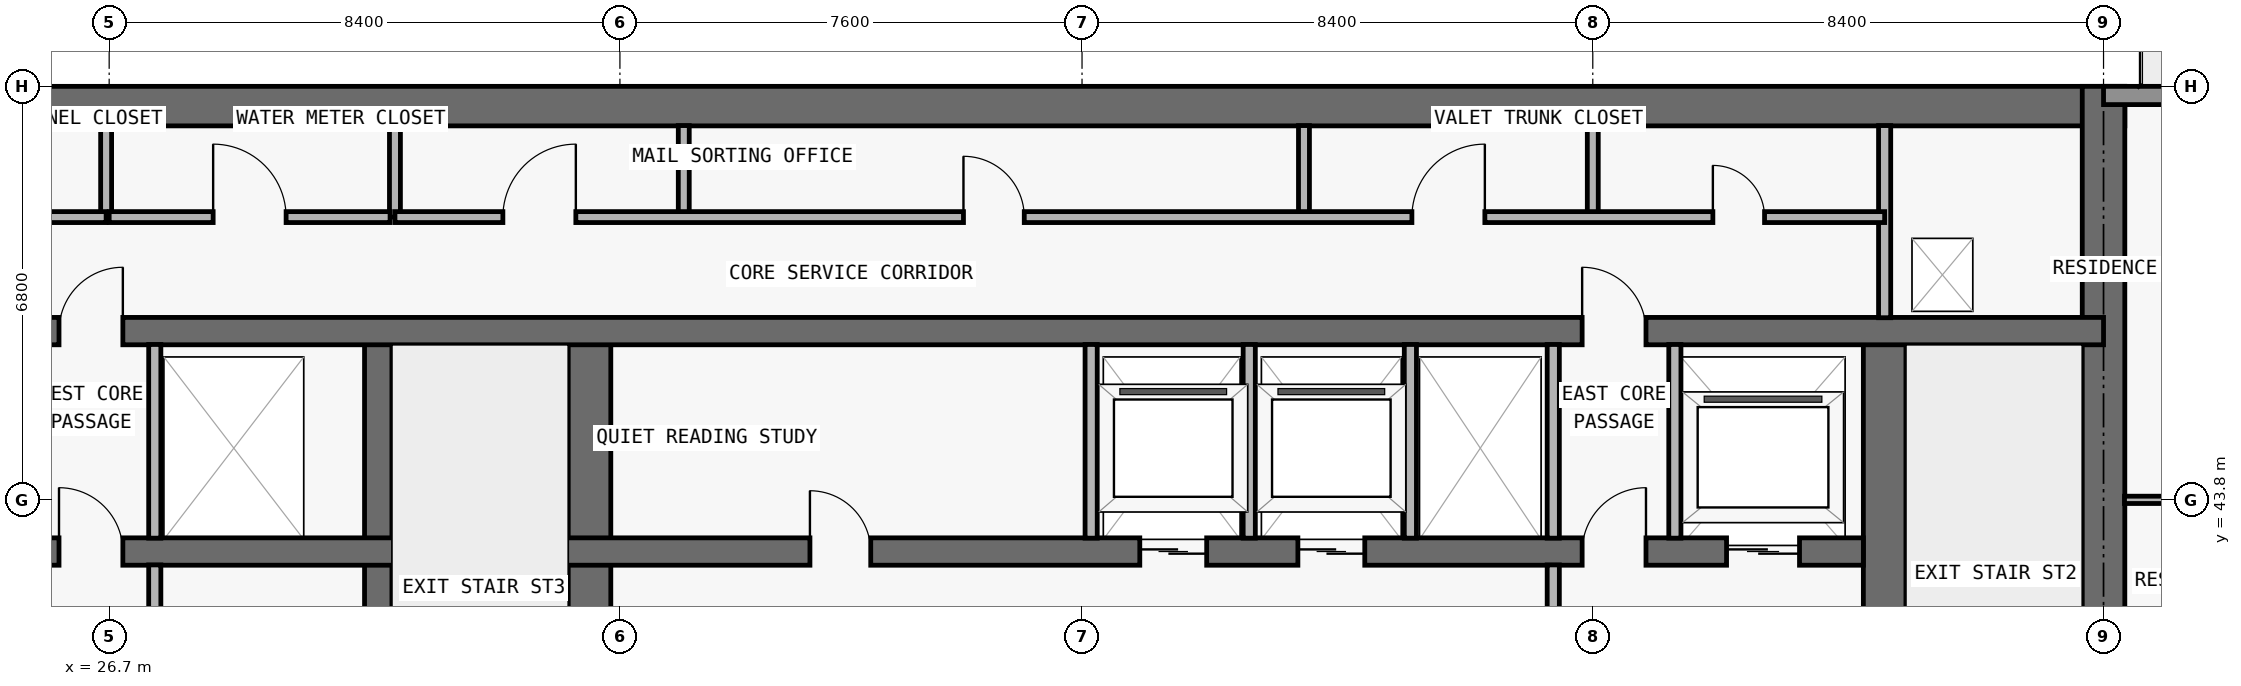
"""IFC4 building model, lengths in metres.
Left out: names, types, materials, properties, quantities, classifications, styles, units other than length and angle.
Written with IfcOpenShell. Run it as: python <this file> out.ifc"""

import sys

from ifc_helpers import new_model, si_unit, direction, frame, frame_2d, origin, place, context, subcontext, project, spatial, rectangle, extrude, element, fill, save


model = new_model("IFC4")
c1 = context("Model", 3, precision=1e-05, world=origin(), true_north=direction((0.0, 1.0)))
c2 = subcontext(c1, "Body", "Model", "MODEL_VIEW")
j1 = project(units=[si_unit("LENGTHUNIT", "METRE"), si_unit("PLANEANGLEUNIT", "RADIAN")], contexts=[c1])
p1 = place(None, origin())
s1 = spatial("IfcSite", under=j1, at=p1, CompositionType="ELEMENT")
p2 = place(p1, origin())
s2 = spatial("IfcBuilding", under=s1, at=p2, CompositionType="ELEMENT")
p3 = place(p2, frame((0.0, 0.0, 167.1)))
s3 = spatial("IfcBuildingStorey", under=s2, at=p3, CompositionType="ELEMENT", Elevation=167.1)
p4 = place(p3, frame((17.95, 50.275, 0.0), z_axis=(0.0, 0.0, 1.0), x_axis=(1.0, 0.0, 0.0)))
e1 = element("IfcWall", 1, at=p4, inside=s3, PredefinedType="SHEAR", context=c2, shape_type="SweptSolid", body=[
    extrude(rectangle(XDim=41.9, YDim=0.65, at=frame_2d((20.95, 0.0))), origin(), (0.0, 0.0, 1.0), 3.05),
])
p5 = place(p3, frame((59.5, 36.65, 0.0), z_axis=(0.0, 0.0, 1.0), x_axis=(0.0, 1.0, 0.0)))
e2 = element("IfcWall", 2, at=p5, inside=s3, PredefinedType="SHEAR", context=c2, shape_type="SweptSolid", body=[
    extrude(rectangle(XDim=13.95, YDim=0.7, at=frame_2d((6.975, 0.0))), origin(), (0.0, 0.0, 1.0), 3.05),
])
p6 = place(p3, frame((55.9, 37.0, 0.0), z_axis=(0.0, 0.0, 1.0), x_axis=(0.0, 1.0, 0.0)))
e3 = element("IfcWall", 3, at=p6, inside=s3, PredefinedType="SHEAR", context=c2, shape_type="SweptSolid", body=[
    extrude(rectangle(XDim=9.575, YDim=0.7, at=frame_2d((4.788, 0.0))), origin(), (0.0, 0.0, 1.0), 3.05),
])
p7 = place(p6, frame((0.55, 0.0, 0.0)))
e4 = element("IfcOpeningElement", 4, at=p7, cuts=e3, PredefinedType="OPENING", context=c2, shape_type="SweptSolid", body=[
    extrude(rectangle(XDim=1.1, YDim=2.15, at=frame_2d((0.55, 1.075))), frame((0.0, 0.36, 0.0), z_axis=(0.0, -1.0, 0.0), x_axis=(1.0, 0.0, 0.0)), (0.0, 0.0, 1.0), 0.72),
])
p8 = place(p3, frame((31.125, 37.0, 0.0), z_axis=(0.0, 0.0, 1.0), x_axis=(0.0, 1.0, 0.0)))
e5 = element("IfcWall", 5, at=p8, inside=s3, PredefinedType="SHEAR", context=c2, shape_type="SweptSolid", body=[
    extrude(rectangle(XDim=9.575, YDim=0.45, at=frame_2d((4.788, 0.0))), origin(), (0.0, 0.0, 1.0), 3.05),
])
p9 = place(p3, frame((34.6, 37.0, 0.0), z_axis=(0.0, 0.0, 1.0), x_axis=(0.0, 1.0, 0.0)))
e6 = element("IfcWall", 6, at=p9, inside=s3, PredefinedType="SHEAR", context=c2, shape_type="SweptSolid", body=[
    extrude(rectangle(XDim=9.575, YDim=0.7, at=frame_2d((4.788, 0.0))), origin(), (0.0, 0.0, 1.0), 3.05),
])
p10 = place(p3, frame((22.25, 42.95, 0.0), z_axis=(0.0, 0.0, 1.0), x_axis=(1.0, 0.0, 0.0)))
e7 = element("IfcWall", 7, at=p10, inside=s3, PredefinedType="SHEAR", context=c2, shape_type="SweptSolid", body=[
    extrude(rectangle(XDim=33.3, YDim=0.45, at=frame_2d((16.65, 0.0))), origin(), (0.0, 0.0, 1.0), 3.05),
])
p11 = place(p10, frame((1.05, 0.0, 0.0)))
e8 = element("IfcOpeningElement", 8, at=p11, cuts=e7, PredefinedType="OPENING", context=c2, shape_type="SweptSolid", body=[
    extrude(rectangle(XDim=1.2, YDim=2.2, at=frame_2d((0.6, 1.1))), frame((0.0, 0.235, 0.0), z_axis=(0.0, -1.0, 0.0), x_axis=(1.0, 0.0, 0.0)), (0.0, 0.0, 1.0), 0.47),
])
p12 = place(p10, frame((31.05, 0.0, 0.0)))
e9 = element("IfcOpeningElement", 9, at=p12, cuts=e7, PredefinedType="OPENING", context=c2, shape_type="SweptSolid", body=[
    extrude(rectangle(XDim=1.2, YDim=2.2, at=frame_2d((0.6, 1.1))), frame((0.0, 0.235, 0.0), z_axis=(0.0, -1.0, 0.0), x_axis=(1.0, 0.0, 0.0)), (0.0, 0.0, 1.0), 0.47),
])
p13 = place(p10, frame((21.4, 0.0, 0.0)))
e10 = element("IfcOpeningElement", 10, at=p13, cuts=e7, PredefinedType="OPENING", context=c2, shape_type="SweptSolid", body=[
    extrude(rectangle(XDim=1.1, YDim=2.2, at=frame_2d((0.55, 1.1))), frame((0.0, 0.235, 0.0), z_axis=(0.0, -1.0, 0.0), x_axis=(1.0, 0.0, 0.0)), (0.0, 0.0, 1.0), 0.47),
])
p14 = place(p10, frame((24.0, 0.0, 0.0)))
e11 = element("IfcOpeningElement", 11, at=p14, cuts=e7, PredefinedType="OPENING", context=c2, shape_type="SweptSolid", body=[
    extrude(rectangle(XDim=1.1, YDim=2.2, at=frame_2d((0.55, 1.1))), frame((0.0, 0.235, 0.0), z_axis=(0.0, -1.0, 0.0), x_axis=(1.0, 0.0, 0.0)), (0.0, 0.0, 1.0), 0.47),
])
p15 = place(p10, frame((3.625, 0.0, 0.0)))
e12 = element("IfcOpeningElement", 12, at=p15, cuts=e7, PredefinedType="OPENING", context=c2, shape_type="SweptSolid", body=[
    extrude(rectangle(XDim=1.05, YDim=2.15, at=frame_2d((0.525, 1.075))), frame((0.0, 0.235, 0.0), z_axis=(0.0, -1.0, 0.0), x_axis=(1.0, 0.0, 0.0)), (0.0, 0.0, 1.0), 0.47),
])
p16 = place(p10, frame((28.675, 0.0, 0.0)))
e13 = element("IfcOpeningElement", 13, at=p16, cuts=e7, PredefinedType="OPENING", context=c2, shape_type="SweptSolid", body=[
    extrude(rectangle(XDim=1.05, YDim=2.15, at=frame_2d((0.525, 1.075))), frame((0.0, 0.235, 0.0), z_axis=(0.0, -1.0, 0.0), x_axis=(1.0, 0.0, 0.0)), (0.0, 0.0, 1.0), 0.47),
])
p17 = place(p10, frame((15.975, 0.0, 0.0)))
e14 = element("IfcOpeningElement", 14, at=p17, cuts=e7, PredefinedType="OPENING", context=c2, shape_type="SweptSolid", body=[
    extrude(rectangle(XDim=1.0, YDim=2.2, at=frame_2d((0.5, 1.1))), frame((0.0, 0.235, 0.0), z_axis=(0.0, -1.0, 0.0), x_axis=(1.0, 0.0, 0.0)), (0.0, 0.0, 1.0), 0.47),
])
p18 = place(p3, frame((18.3, 46.575, 0.0), z_axis=(0.0, 0.0, 1.0), x_axis=(1.0, 0.0, 0.0)))
e15 = element("IfcWall", 15, at=p18, inside=s3, PredefinedType="SHEAR", context=c2, shape_type="SweptSolid", body=[
    extrude(rectangle(XDim=41.2, YDim=0.45, at=frame_2d((20.6, 0.0))), origin(), (0.0, 0.0, 1.0), 3.05),
])
p19 = place(p18, frame((7.575, 0.0, 0.0)))
e16 = element("IfcOpeningElement", 16, at=p19, cuts=e15, PredefinedType="OPENING", context=c2, shape_type="SweptSolid", body=[
    extrude(rectangle(XDim=1.05, YDim=2.15, at=frame_2d((0.525, 1.075))), frame((0.0, 0.235, 0.0), z_axis=(0.0, -1.0, 0.0), x_axis=(1.0, 0.0, 0.0)), (0.0, 0.0, 1.0), 0.47),
])
p20 = place(p18, frame((32.625, 0.0, 0.0)))
e17 = element("IfcOpeningElement", 17, at=p20, cuts=e15, PredefinedType="OPENING", context=c2, shape_type="SweptSolid", body=[
    extrude(rectangle(XDim=1.05, YDim=2.15, at=frame_2d((0.525, 1.075))), frame((0.0, 0.235, 0.0), z_axis=(0.0, -1.0, 0.0), x_axis=(1.0, 0.0, 0.0)), (0.0, 0.0, 1.0), 0.47),
])
p21 = place(p3, frame((59.5, 50.45, 0.0), z_axis=(0.0, 0.0, 1.0), x_axis=(1.0, 0.0, 0.0)))
e18 = element("IfcWall", 18, at=p21, inside=s3, PredefinedType="STANDARD", context=c2, shape_type="SweptSolid", body=[
    extrude(rectangle(XDim=8.2, YDim=0.3, at=frame_2d((4.1, 0.0))), origin(), (0.0, 0.0, 1.0), 3.05),
])
p22 = place(p21, frame((3.1, 0.0, 0.0)))
e19 = element("IfcOpeningElement", 19, at=p22, cuts=e18, PredefinedType="OPENING", context=c2, shape_type="SweptSolid", body=[
    extrude(rectangle(XDim=2.0, YDim=2.3, at=frame_2d((1.0, 1.15))), frame((0.0, 0.16, 0.0), z_axis=(0.0, -1.0, 0.0), x_axis=(1.0, 0.0, 0.0)), (0.0, 0.0, 1.0), 0.32),
])
p23 = place(p3, frame((26.65, 48.45, 0.0), z_axis=(0.0, 0.0, 1.0), x_axis=(0.0, 1.0, 0.0)))
e20 = element("IfcWall", 20, at=p23, inside=s3, PredefinedType="PARTITIONING", context=c2, shape_type="SweptSolid", body=[
    extrude(rectangle(XDim=1.505, YDim=0.18, at=frame_2d((0.752, 0.0))), origin(), (0.0, 0.0, 1.0), 3.05),
])
p24 = place(p3, frame((27.45, 37.345, 0.0), z_axis=(0.0, 0.0, 1.0), x_axis=(0.0, 1.0, 0.0)))
e21 = element("IfcWall", 21, at=p24, inside=s3, PredefinedType="PARTITIONING", context=c2, shape_type="SweptSolid", body=[
    extrude(rectangle(XDim=5.385, YDim=0.2, at=frame_2d((2.692, 0.0))), origin(), (0.0, 0.0, 1.0), 3.05),
])
p25 = place(p3, frame((27.45, 43.17, 0.0), z_axis=(0.0, 0.0, 1.0), x_axis=(0.0, 1.0, 0.0)))
e22 = element("IfcWall", 22, at=p25, inside=s3, PredefinedType="PARTITIONING", context=c2, shape_type="SweptSolid", body=[
    extrude(rectangle(XDim=3.185, YDim=0.2, at=frame_2d((1.593, 0.0))), origin(), (0.0, 0.0, 1.0), 3.05),
])
for number, where, z_axis, x_axis in (
    (23, (31.4, 48.45, 0.0), (0.0, 0.0, 1.0), (0.0, 1.0, 0.0)),
    (24, (36.15, 48.45, 0.0), (0.0, 0.0, 1.0), (0.0, 1.0, 0.0)),
):
    element("IfcWall", number, at=place(p3, frame(where, z_axis=z_axis, x_axis=x_axis)), inside=s3, PredefinedType="PARTITIONING", context=c2, shape_type="SweptSolid", body=[
        extrude(rectangle(XDim=1.505, YDim=0.18, at=frame_2d((0.752, 0.0))), origin(), (0.0, 0.0, 1.0), 3.05),
    ])
for number, where, z_axis, x_axis in (
    (25, (42.85, 43.17, 0.0), (0.0, 0.0, 1.0), (0.0, 1.0, 0.0)),
    (26, (45.45, 43.17, 0.0), (0.0, 0.0, 1.0), (0.0, 1.0, 0.0)),
):
    element("IfcWall", number, at=place(p3, frame(where, z_axis=z_axis, x_axis=x_axis)), inside=s3, PredefinedType="PARTITIONING", context=c2, shape_type="SweptSolid", body=[
        extrude(rectangle(XDim=3.185, YDim=0.2, at=frame_2d((1.593, 0.0))), origin(), (0.0, 0.0, 1.0), 3.05),
    ])
p26 = place(p3, frame((46.35, 48.45, 0.0), z_axis=(0.0, 0.0, 1.0), x_axis=(0.0, 1.0, 0.0)))
e27 = element("IfcWall", 27, at=p26, inside=s3, PredefinedType="PARTITIONING", context=c2, shape_type="SweptSolid", body=[
    extrude(rectangle(XDim=1.505, YDim=0.18, at=frame_2d((0.752, 0.0))), origin(), (0.0, 0.0, 1.0), 3.05),
])
p27 = place(p3, frame((48.1, 43.17, 0.0), z_axis=(0.0, 0.0, 1.0), x_axis=(0.0, 1.0, 0.0)))
e28 = element("IfcWall", 28, at=p27, inside=s3, PredefinedType="PARTITIONING", context=c2, shape_type="SweptSolid", body=[
    extrude(rectangle(XDim=3.185, YDim=0.2, at=frame_2d((1.593, 0.0))), origin(), (0.0, 0.0, 1.0), 3.05),
])
p28 = place(p3, frame((50.45, 37.345, 0.0), z_axis=(0.0, 0.0, 1.0), x_axis=(0.0, 1.0, 0.0)))
e29 = element("IfcWall", 29, at=p28, inside=s3, PredefinedType="PARTITIONING", context=c2, shape_type="SweptSolid", body=[
    extrude(rectangle(XDim=5.385, YDim=0.2, at=frame_2d((2.692, 0.0))), origin(), (0.0, 0.0, 1.0), 3.05),
])
p29 = place(p3, frame((50.45, 43.17, 0.0), z_axis=(0.0, 0.0, 1.0), x_axis=(0.0, 1.0, 0.0)))
e30 = element("IfcWall", 30, at=p29, inside=s3, PredefinedType="PARTITIONING", context=c2, shape_type="SweptSolid", body=[
    extrude(rectangle(XDim=3.185, YDim=0.2, at=frame_2d((1.593, 0.0))), origin(), (0.0, 0.0, 1.0), 3.05),
])
p30 = place(p3, frame((51.1, 48.45, 0.0), z_axis=(0.0, 0.0, 1.0), x_axis=(0.0, 1.0, 0.0)))
e31 = element("IfcWall", 31, at=p30, inside=s3, PredefinedType="PARTITIONING", context=c2, shape_type="SweptSolid", body=[
    extrude(rectangle(XDim=1.505, YDim=0.18, at=frame_2d((0.752, 0.0))), origin(), (0.0, 0.0, 1.0), 3.05),
])
p31 = place(p3, frame((52.45, 43.17, 0.0), z_axis=(0.0, 0.0, 1.0), x_axis=(0.0, 1.0, 0.0)))
e32 = element("IfcWall", 32, at=p31, inside=s3, PredefinedType="PARTITIONING", context=c2, shape_type="SweptSolid", body=[
    extrude(rectangle(XDim=3.185, YDim=0.2, at=frame_2d((1.593, 0.0))), origin(), (0.0, 0.0, 1.0), 3.05),
])
p32 = place(p3, frame((55.9, 46.795, 0.0), z_axis=(0.0, 0.0, 1.0), x_axis=(0.0, 1.0, 0.0)))
e33 = element("IfcWall", 33, at=p32, inside=s3, PredefinedType="PARTITIONING", context=c2, shape_type="SweptSolid", body=[
    extrude(rectangle(XDim=3.16, YDim=0.2, at=frame_2d((1.58, 0.0))), origin(), (0.0, 0.0, 1.0), 3.05),
])
p33 = place(p3, frame((59.845, 43.8, 0.0), z_axis=(0.0, 0.0, 1.0), x_axis=(1.0, 0.0, 0.0)))
e34 = element("IfcWall", 34, at=p33, inside=s3, PredefinedType="PARTITIONING", context=c2, shape_type="SweptSolid", body=[
    extrude(rectangle(XDim=11.56, YDim=0.12, at=frame_2d((5.78, 0.0))), origin(), (0.0, 0.0, 1.0), 2.418),
])
p34 = place(p33, frame((3.445, 0.0, 0.0)))
e35 = element("IfcOpeningElement", 35, at=p34, cuts=e34, PredefinedType="OPENING", context=c2, shape_type="SweptSolid", body=[
    extrude(rectangle(XDim=0.9, YDim=2.15, at=frame_2d((0.45, 1.075))), frame((0.0, 0.07, 0.0), z_axis=(0.0, -1.0, 0.0), x_axis=(1.0, 0.0, 0.0)), (0.0, 0.0, 1.0), 0.14),
])
p35 = place(p33, frame((0.752, 0.0, 0.0)))
e36 = element("IfcOpeningElement", 36, at=p35, cuts=e34, PredefinedType="OPENING", context=c2, shape_type="SweptSolid", body=[
    extrude(rectangle(XDim=0.85, YDim=2.1, at=frame_2d((0.425, 1.05))), frame((0.0, 0.07, 0.0), z_axis=(0.0, -1.0, 0.0), x_axis=(1.0, 0.0, 0.0)), (0.0, 0.0, 1.0), 0.14),
])
p36 = place(p3, frame((21.9, 48.45, 0.0), z_axis=(0.0, 0.0, 1.0), x_axis=(1.0, 0.0, 0.0)))
e37 = element("IfcWall", 37, at=p36, inside=s3, PredefinedType="PARTITIONING", context=c2, shape_type="SweptSolid", body=[
    extrude(rectangle(XDim=4.75, YDim=0.18, at=frame_2d((2.375, 0.0))), origin(), (0.0, 0.0, 1.0), 3.05),
])
p37 = place(p36, frame((1.775, 0.0, 0.0)))
e38 = element("IfcOpeningElement", 38, at=p37, cuts=e37, PredefinedType="OPENING", context=c2, shape_type="SweptSolid", body=[
    extrude(rectangle(XDim=1.2, YDim=2.2, at=frame_2d((0.6, 1.1))), frame((0.0, 0.1, 0.0), z_axis=(0.0, -1.0, 0.0), x_axis=(1.0, 0.0, 0.0)), (0.0, 0.0, 1.0), 0.2),
])
p38 = place(p3, frame((26.7, 48.45, 0.0), z_axis=(0.0, 0.0, 1.0), x_axis=(1.0, 0.0, 0.0)))
e39 = element("IfcWall", 39, at=p38, inside=s3, PredefinedType="PARTITIONING", context=c2, shape_type="SweptSolid", body=[
    extrude(rectangle(XDim=4.62, YDim=0.18, at=frame_2d((2.31, 0.0))), origin(), (0.0, 0.0, 1.0), 3.05),
])
p39 = place(p38, frame((1.71, 0.0, 0.0)))
e40 = element("IfcOpeningElement", 40, at=p39, cuts=e39, PredefinedType="OPENING", context=c2, shape_type="SweptSolid", body=[
    extrude(rectangle(XDim=1.2, YDim=2.2, at=frame_2d((0.6, 1.1))), frame((0.0, 0.1, 0.0), z_axis=(0.0, -1.0, 0.0), x_axis=(1.0, 0.0, 0.0)), (0.0, 0.0, 1.0), 0.2),
])
p40 = place(p3, frame((31.4, 48.45, 0.0), z_axis=(0.0, 0.0, 1.0), x_axis=(1.0, 0.0, 0.0)))
e41 = element("IfcWall", 41, at=p40, inside=s3, PredefinedType="PARTITIONING", context=c2, shape_type="SweptSolid", body=[
    extrude(rectangle(XDim=24.5, YDim=0.18, at=frame_2d((12.25, 0.0))), origin(), (0.0, 0.0, 1.0), 3.05),
])
p41 = place(p40, frame((1.775, 0.0, 0.0)))
e42 = element("IfcOpeningElement", 42, at=p41, cuts=e41, PredefinedType="OPENING", context=c2, shape_type="SweptSolid", body=[
    extrude(rectangle(XDim=1.2, YDim=2.2, at=frame_2d((0.6, 1.1))), frame((0.0, 0.1, 0.0), z_axis=(0.0, -1.0, 0.0), x_axis=(1.0, 0.0, 0.0)), (0.0, 0.0, 1.0), 0.2),
])
p42 = place(p40, frame((9.35, 0.0, 0.0)))
e43 = element("IfcOpeningElement", 43, at=p42, cuts=e41, PredefinedType="OPENING", context=c2, shape_type="SweptSolid", body=[
    extrude(rectangle(XDim=1.0, YDim=2.2, at=frame_2d((0.5, 1.1))), frame((0.0, 0.1, 0.0), z_axis=(0.0, -1.0, 0.0), x_axis=(1.0, 0.0, 0.0)), (0.0, 0.0, 1.0), 0.2),
])
p43 = place(p40, frame((16.725, 0.0, 0.0)))
e44 = element("IfcOpeningElement", 44, at=p43, cuts=e41, PredefinedType="OPENING", context=c2, shape_type="SweptSolid", body=[
    extrude(rectangle(XDim=1.2, YDim=2.2, at=frame_2d((0.6, 1.1))), frame((0.0, 0.1, 0.0), z_axis=(0.0, -1.0, 0.0), x_axis=(1.0, 0.0, 0.0)), (0.0, 0.0, 1.0), 0.2),
])
p44 = place(p40, frame((21.675, 0.0, 0.0)))
e45 = element("IfcOpeningElement", 45, at=p44, cuts=e41, PredefinedType="OPENING", context=c2, shape_type="SweptSolid", body=[
    extrude(rectangle(XDim=0.85, YDim=2.1, at=frame_2d((0.425, 1.05))), frame((0.0, 0.1, 0.0), z_axis=(0.0, -1.0, 0.0), x_axis=(1.0, 0.0, 0.0)), (0.0, 0.0, 1.0), 0.2),
])
p45 = place(p12, origin())
e46 = element("IfcDoor", 46, at=p45, inside=s3, OperationType="DOUBLE_DOOR_SLIDING", PredefinedType="DOOR", context=c2, shape_type="SweptSolid", body=[
    extrude(rectangle(XDim=1.2, YDim=2.2, at=frame_2d((0.6, 1.1))), frame((0.0, 0.025, 0.0), z_axis=(0.0, -1.0, 0.0), x_axis=(1.0, 0.0, 0.0)), (0.0, 0.0, 1.0), 0.05),
])
fill(e9, e46)
p46 = place(p13, origin())
e47 = element("IfcDoor", 47, at=p46, inside=s3, OperationType="DOUBLE_DOOR_SLIDING", PredefinedType="DOOR", context=c2, shape_type="SweptSolid", body=[
    extrude(rectangle(XDim=1.1, YDim=2.2, at=frame_2d((0.55, 1.1))), frame((0.0, 0.025, 0.0), z_axis=(0.0, -1.0, 0.0), x_axis=(1.0, 0.0, 0.0)), (0.0, 0.0, 1.0), 0.05),
])
fill(e10, e47)
p47 = place(p14, origin())
e48 = element("IfcDoor", 48, at=p47, inside=s3, OperationType="DOUBLE_DOOR_SLIDING", PredefinedType="DOOR", context=c2, shape_type="SweptSolid", body=[
    extrude(rectangle(XDim=1.1, YDim=2.2, at=frame_2d((0.55, 1.1))), frame((0.0, 0.025, 0.0), z_axis=(0.0, -1.0, 0.0), x_axis=(1.0, 0.0, 0.0)), (0.0, 0.0, 1.0), 0.05),
])
fill(e11, e48)
p48 = place(p15, origin())
e49 = element("IfcDoor", 49, at=p48, inside=s3, OperationType="SINGLE_SWING_LEFT", PredefinedType="DOOR", context=c2, shape_type="SweptSolid", body=[
    extrude(rectangle(XDim=1.05, YDim=2.15, at=frame_2d((0.525, 1.075))), frame((0.0, 0.025, 0.0), z_axis=(0.0, -1.0, 0.0), x_axis=(1.0, 0.0, 0.0)), (0.0, 0.0, 1.0), 0.05),
])
fill(e12, e49)
p49 = place(p16, origin())
e50 = element("IfcDoor", 50, at=p49, inside=s3, OperationType="SINGLE_SWING_RIGHT", PredefinedType="DOOR", context=c2, shape_type="SweptSolid", body=[
    extrude(rectangle(XDim=1.05, YDim=2.15, at=frame_2d((0.525, 1.075))), frame((0.0, 0.025, 0.0), z_axis=(0.0, -1.0, 0.0), x_axis=(1.0, 0.0, 0.0)), (0.0, 0.0, 1.0), 0.05),
])
fill(e13, e50)
p50 = place(p17, origin())
e51 = element("IfcDoor", 51, at=p50, inside=s3, OperationType="SINGLE_SWING_LEFT", PredefinedType="DOOR", context=c2, shape_type="SweptSolid", body=[
    extrude(rectangle(XDim=1.0, YDim=2.2, at=frame_2d((0.5, 1.1))), frame((0.0, 0.025, 0.0), z_axis=(0.0, -1.0, 0.0), x_axis=(1.0, 0.0, 0.0)), (0.0, 0.0, 1.0), 0.05),
])
fill(e14, e51)
p51 = place(p19, origin())
e52 = element("IfcDoor", 52, at=p51, inside=s3, OperationType="SINGLE_SWING_RIGHT", PredefinedType="DOOR", context=c2, shape_type="SweptSolid", body=[
    extrude(rectangle(XDim=1.05, YDim=2.15, at=frame_2d((0.525, 1.075))), frame((0.0, 0.025, 0.0), z_axis=(0.0, -1.0, 0.0), x_axis=(1.0, 0.0, 0.0)), (0.0, 0.0, 1.0), 0.05),
])
fill(e16, e52)
p52 = place(p20, origin())
e53 = element("IfcDoor", 53, at=p52, inside=s3, OperationType="SINGLE_SWING_LEFT", PredefinedType="DOOR", context=c2, shape_type="SweptSolid", body=[
    extrude(rectangle(XDim=1.05, YDim=2.15, at=frame_2d((0.525, 1.075))), frame((0.0, 0.025, 0.0), z_axis=(0.0, -1.0, 0.0), x_axis=(1.0, 0.0, 0.0)), (0.0, 0.0, 1.0), 0.05),
])
fill(e17, e53)
p53 = place(p39, origin())
e54 = element("IfcDoor", 54, at=p53, inside=s3, OperationType="SINGLE_SWING_LEFT", PredefinedType="DOOR", context=c2, shape_type="SweptSolid", body=[
    extrude(rectangle(XDim=1.2, YDim=2.2, at=frame_2d((0.6, 1.1))), frame((0.0, 0.025, 0.0), z_axis=(0.0, -1.0, 0.0), x_axis=(1.0, 0.0, 0.0)), (0.0, 0.0, 1.0), 0.05),
])
fill(e40, e54)
p54 = place(p41, origin())
e55 = element("IfcDoor", 55, at=p54, inside=s3, OperationType="SINGLE_SWING_RIGHT", PredefinedType="DOOR", context=c2, shape_type="SweptSolid", body=[
    extrude(rectangle(XDim=1.2, YDim=2.2, at=frame_2d((0.6, 1.1))), frame((0.0, 0.025, 0.0), z_axis=(0.0, -1.0, 0.0), x_axis=(1.0, 0.0, 0.0)), (0.0, 0.0, 1.0), 0.05),
])
fill(e42, e55)
p55 = place(p42, origin())
e56 = element("IfcDoor", 56, at=p55, inside=s3, OperationType="SINGLE_SWING_LEFT", PredefinedType="DOOR", context=c2, shape_type="SweptSolid", body=[
    extrude(rectangle(XDim=1.0, YDim=2.2, at=frame_2d((0.5, 1.1))), frame((0.0, 0.025, 0.0), z_axis=(0.0, -1.0, 0.0), x_axis=(1.0, 0.0, 0.0)), (0.0, 0.0, 1.0), 0.05),
])
fill(e43, e56)
p56 = place(p43, origin())
e57 = element("IfcDoor", 57, at=p56, inside=s3, OperationType="SINGLE_SWING_RIGHT", PredefinedType="DOOR", context=c2, shape_type="SweptSolid", body=[
    extrude(rectangle(XDim=1.2, YDim=2.2, at=frame_2d((0.6, 1.1))), frame((0.0, 0.025, 0.0), z_axis=(0.0, -1.0, 0.0), x_axis=(1.0, 0.0, 0.0)), (0.0, 0.0, 1.0), 0.05),
])
fill(e44, e57)
p57 = place(p44, origin())
e58 = element("IfcDoor", 58, at=p57, inside=s3, OperationType="SINGLE_SWING_LEFT", PredefinedType="DOOR", context=c2, shape_type="SweptSolid", body=[
    extrude(rectangle(XDim=0.85, YDim=2.1, at=frame_2d((0.425, 1.05))), frame((0.0, 0.025, 0.0), z_axis=(0.0, -1.0, 0.0), x_axis=(1.0, 0.0, 0.0)), (0.0, 0.0, 1.0), 0.05),
])
fill(e45, e58)
save(model, sys.argv[1])
